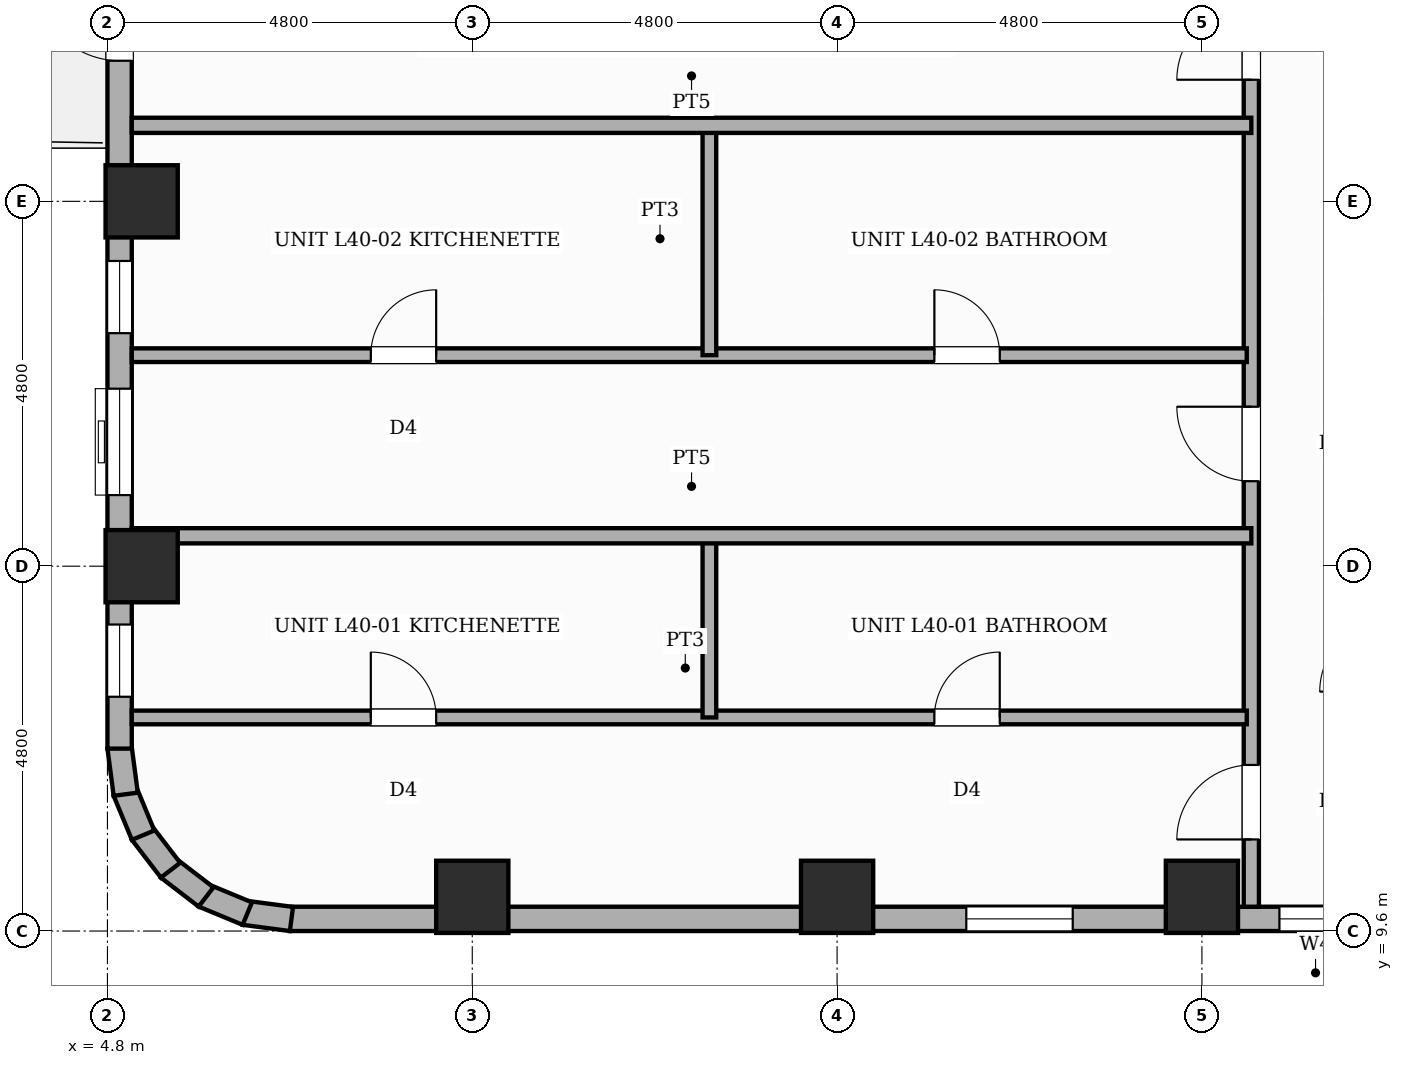
"""IFC4 building model, lengths in metres.
Left out: names, types, materials, properties, quantities, classifications, styles, units other than length and angle.
Written with IfcOpenShell. Run it as: python <this file> out.ifc"""

import sys

from ifc_helpers import new_model, si_unit, direction, frame, frame_2d, origin, origin_2d, place, context, subcontext, project, spatial, rectangle, extrude, element, fill, save


model = new_model("IFC4")
c1 = context("Model", 3, precision=1e-05, world=origin(), true_north=direction((0.0, 1.0)))
c2 = subcontext(c1, "Body", "Model", "MODEL_VIEW")
j1 = project(units=[si_unit("LENGTHUNIT", "METRE"), si_unit("PLANEANGLEUNIT", "RADIAN")], contexts=[c1])
p1 = place(None, origin())
s1 = spatial("IfcSite", under=j1, at=p1, CompositionType="ELEMENT")
p2 = place(p1, origin())
s2 = spatial("IfcBuilding", under=s1, at=p2, CompositionType="ELEMENT")
p3 = place(p2, frame((0.0, 0.0, 154.0)))
s3 = spatial("IfcBuildingStorey", under=s2, at=p3, CompositionType="ELEMENT", Elevation=154.0)
for number, where, z_axis, x_axis in (
    (1, (5.25, 14.4, 0.0), (0.0, 0.0, 1.0), (1.0, 0.0, 0.0)),
    (2, (5.25, 19.2, 0.0), (0.0, 0.0, 1.0), (1.0, 0.0, 0.0)),
    (3, (9.6, 10.05, 0.0), (0.0, 0.0, 1.0), (1.0, 0.0, 0.0)),
    (4, (14.4, 10.05, 0.0), (0.0, 0.0, 1.0), (1.0, 0.0, 0.0)),
    (5, (19.2, 10.05, 0.0), (0.0, 0.0, 1.0), (1.0, 0.0, 0.0)),
):
    element("IfcColumn", number, at=place(p3, frame(where, z_axis=z_axis, x_axis=x_axis)), inside=s3, PredefinedType="COLUMN", context=c2, shape_type="SweptSolid", body=[
        extrude(rectangle(XDim=0.95, YDim=0.95, at=origin_2d()), origin(), (0.0, 0.0, 1.0), 3.6),
    ])
p4 = place(p3, frame((21.6, 9.76, 0.0), z_axis=(0.0, 0.0, 1.0), x_axis=(-1.0, 0.0, 0.0)))
e6 = element("IfcWall", 6, at=p4, inside=s3, PredefinedType="STANDARD", context=c2, shape_type="SweptSolid", body=[
    extrude(rectangle(XDim=14.4, YDim=0.32, at=frame_2d((7.2, 0.0))), origin(), (0.0, 0.0, 1.0), 2.54),
])
p5 = place(p4, frame((4.1, 0.0, 0.65)))
e7 = element("IfcOpeningElement", 7, at=p5, cuts=e6, PredefinedType="OPENING", context=c2, shape_type="SweptSolid", body=[
    extrude(rectangle(XDim=1.4, YDim=1.1, at=frame_2d((0.7, 0.55))), frame((0.0, 0.17, 0.0), z_axis=(0.0, -1.0, 0.0), x_axis=(1.0, 0.0, 0.0)), (0.0, 0.0, 1.0), 0.34),
])
p6 = place(p4, frame((0.43, 0.0, 0.45)))
e8 = element("IfcOpeningElement", 8, at=p6, cuts=e6, PredefinedType="OPENING", context=c2, shape_type="SweptSolid", body=[
    extrude(rectangle(XDim=0.95, YDim=1.8, at=frame_2d((0.475, 0.9))), frame((0.0, 0.17, 0.0), z_axis=(0.0, -1.0, 0.0), x_axis=(1.0, 0.0, 0.0)), (0.0, 0.0, 1.0), 0.34),
])
p7 = place(p3, frame((7.221, 9.759, 0.0), z_axis=(0.0, 0.0, 1.0), x_axis=(-0.991447664465, 0.130504898859, 0.0)))
e9 = element("IfcWall", 9, at=p7, inside=s3, PredefinedType="STANDARD", context=c2, shape_type="SweptSolid", body=[
    extrude(rectangle(XDim=0.627, YDim=0.32, at=frame_2d((0.313, 0.0))), origin(), (0.0, 0.0, 1.0), 3.36),
])
p8 = place(p3, frame((6.64, 9.83, 0.0), z_axis=(0.0, 0.0, 1.0), x_axis=(-0.923836271867, 0.382787856107, 0.0)))
e10 = element("IfcWall", 10, at=p8, inside=s3, PredefinedType="STANDARD", context=c2, shape_type="SweptSolid", body=[
    extrude(rectangle(XDim=0.626, YDim=0.32, at=frame_2d((0.313, 0.0))), origin(), (0.0, 0.0, 1.0), 3.36),
])
p9 = place(p3, frame((6.097, 10.048, 0.0), z_axis=(0.0, 0.0, 1.0), x_axis=(-0.793405610854, 0.608693302629, 0.0)))
e11 = element("IfcWall", 11, at=p9, inside=s3, PredefinedType="STANDARD", context=c2, shape_type="SweptSolid", body=[
    extrude(rectangle(XDim=0.626, YDim=0.32, at=frame_2d((0.313, 0.0))), origin(), (0.0, 0.0, 1.0), 3.36),
])
p10 = place(p3, frame((5.63, 10.4, 0.0), z_axis=(0.0, 0.0, 1.0), x_axis=(-0.608938521285, 0.7932174212, 0.0)))
e12 = element("IfcWall", 12, at=p10, inside=s3, PredefinedType="STANDARD", context=c2, shape_type="SweptSolid", body=[
    extrude(rectangle(XDim=0.627, YDim=0.32, at=frame_2d((0.313, 0.0))), origin(), (0.0, 0.0, 1.0), 3.36),
])
p11 = place(p3, frame((5.269, 10.861, 0.0), z_axis=(0.0, 0.0, 1.0), x_axis=(-0.382650053678, 0.92389335771, 0.0)))
e13 = element("IfcWall", 13, at=p11, inside=s3, PredefinedType="STANDARD", context=c2, shape_type="SweptSolid", body=[
    extrude(rectangle(XDim=0.626, YDim=0.32, at=frame_2d((0.313, 0.0))), origin(), (0.0, 0.0, 1.0), 3.36),
])
p12 = place(p3, frame((5.04, 11.4, 0.0), z_axis=(0.0, 0.0, 1.0), x_axis=(-0.130504898859, 0.991447664465, 0.0)))
e14 = element("IfcWall", 14, at=p12, inside=s3, PredefinedType="STANDARD", context=c2, shape_type="SweptSolid", body=[
    extrude(rectangle(XDim=0.627, YDim=0.32, at=frame_2d((0.313, 0.0))), origin(), (0.0, 0.0, 1.0), 3.36),
])
p13 = place(p3, frame((4.96, 12.0, 0.0), z_axis=(0.0, 0.0, 1.0), x_axis=(0.0, 1.0, 0.0)))
e15 = element("IfcWall", 15, at=p13, inside=s3, PredefinedType="STANDARD", context=c2, shape_type="SweptSolid", body=[
    extrude(rectangle(XDim=33.6, YDim=0.32, at=frame_2d((16.8, 0.0))), origin(), (0.0, 0.0, 1.0), 2.54),
])
p14 = place(p13, frame((9.05, 0.0, 0.0)))
e16 = element("IfcOpeningElement", 16, at=p14, cuts=e15, PredefinedType="OPENING", context=c2, shape_type="SweptSolid", body=[
    extrude(rectangle(XDim=1.1, YDim=2.15, at=frame_2d((0.55, 1.075))), frame((0.0, 0.17, 0.0), z_axis=(0.0, -1.0, 0.0), x_axis=(1.0, 0.0, 0.0)), (0.0, 0.0, 1.0), 0.34),
])
p15 = place(p13, frame((3.335, 0.0, 0.65)))
e17 = element("IfcOpeningElement", 17, at=p15, cuts=e15, PredefinedType="OPENING", context=c2, shape_type="SweptSolid", body=[
    extrude(rectangle(XDim=1.4, YDim=1.1, at=frame_2d((0.7, 0.55))), frame((0.0, 0.17, 0.0), z_axis=(0.0, -1.0, 0.0), x_axis=(1.0, 0.0, 0.0)), (0.0, 0.0, 1.0), 0.34),
])
p16 = place(p13, frame((0.683, 0.0, 0.45)))
e18 = element("IfcOpeningElement", 18, at=p16, cuts=e15, PredefinedType="OPENING", context=c2, shape_type="SweptSolid", body=[
    extrude(rectangle(XDim=0.95, YDim=1.8, at=frame_2d((0.475, 0.9))), frame((0.0, 0.17, 0.0), z_axis=(0.0, -1.0, 0.0), x_axis=(1.0, 0.0, 0.0)), (0.0, 0.0, 1.0), 0.34),
])
p17 = place(p13, frame((5.466, 0.0, 0.45)))
e19 = element("IfcOpeningElement", 19, at=p17, cuts=e15, PredefinedType="OPENING", context=c2, shape_type="SweptSolid", body=[
    extrude(rectangle(XDim=0.95, YDim=1.8, at=frame_2d((0.475, 0.9))), frame((0.0, 0.17, 0.0), z_axis=(0.0, -1.0, 0.0), x_axis=(1.0, 0.0, 0.0)), (0.0, 0.0, 1.0), 0.34),
])
p18 = place(p13, frame((10.548, 0.0, 0.45)))
e20 = element("IfcOpeningElement", 20, at=p18, cuts=e15, PredefinedType="OPENING", context=c2, shape_type="SweptSolid", body=[
    extrude(rectangle(XDim=0.75, YDim=1.8, at=frame_2d((0.375, 0.9))), frame((0.0, 0.17, 0.0), z_axis=(0.0, -1.0, 0.0), x_axis=(1.0, 0.0, 0.0)), (0.0, 0.0, 1.0), 0.34),
])
p19 = place(p13, frame((14.558, 0.0, 0.65)))
e21 = element("IfcOpeningElement", 21, at=p19, cuts=e15, PredefinedType="OPENING", context=c2, shape_type="SweptSolid", body=[
    extrude(rectangle(XDim=1.4, YDim=1.1, at=frame_2d((0.7, 0.55))), frame((0.0, 0.17, 0.0), z_axis=(0.0, -1.0, 0.0), x_axis=(1.0, 0.0, 0.0)), (0.0, 0.0, 1.0), 0.34),
])
p20 = place(p3, frame((19.85, 9.92, 0.0), z_axis=(0.0, 0.0, 1.0), x_axis=(0.0, 1.0, 0.0)))
e22 = element("IfcWall", 22, at=p20, inside=s3, PredefinedType="PARTITIONING", context=c2, shape_type="SweptSolid", body=[
    extrude(rectangle(XDim=15.83, YDim=0.2, at=frame_2d((7.915, 0.0))), origin(), (0.0, 0.0, 1.0), 3.36),
])
p21 = place(p20, frame((0.885, 0.0, 0.0)))
e23 = element("IfcOpeningElement", 23, at=p21, cuts=e22, PredefinedType="OPENING", context=c2, shape_type="SweptSolid", body=[
    extrude(rectangle(XDim=0.98, YDim=2.18, at=frame_2d((0.49, 1.09))), frame((0.0, 0.11, 0.0), z_axis=(0.0, -1.0, 0.0), x_axis=(1.0, 0.0, 0.0)), (0.0, 0.0, 1.0), 0.22),
])
p22 = place(p20, frame((5.598, 0.0, 0.0)))
e24 = element("IfcOpeningElement", 24, at=p22, cuts=e22, PredefinedType="OPENING", context=c2, shape_type="SweptSolid", body=[
    extrude(rectangle(XDim=0.98, YDim=2.18, at=frame_2d((0.49, 1.09))), frame((0.0, 0.11, 0.0), z_axis=(0.0, -1.0, 0.0), x_axis=(1.0, 0.0, 0.0)), (0.0, 0.0, 1.0), 0.22),
])
p23 = place(p20, frame((10.88, 0.0, 0.0)))
e25 = element("IfcOpeningElement", 25, at=p23, cuts=e22, PredefinedType="OPENING", context=c2, shape_type="SweptSolid", body=[
    extrude(rectangle(XDim=0.98, YDim=2.18, at=frame_2d((0.49, 1.09))), frame((0.0, 0.11, 0.0), z_axis=(0.0, -1.0, 0.0), x_axis=(1.0, 0.0, 0.0)), (0.0, 0.0, 1.0), 0.22),
])
p24 = place(p3, frame((5.12, 12.41, 0.0), z_axis=(0.0, 0.0, 1.0), x_axis=(1.0, 0.0, 0.0)))
e26 = element("IfcWall", 26, at=p24, inside=s3, PredefinedType="PLUMBINGWALL", context=c2, shape_type="SweptSolid", body=[
    extrude(rectangle(XDim=14.67, YDim=0.18, at=frame_2d((7.335, 0.0))), origin(), (0.0, 0.0, 1.0), 3.36),
])
p25 = place(p24, frame((3.145, 0.0, 0.0)))
e27 = element("IfcOpeningElement", 27, at=p25, cuts=e26, PredefinedType="OPENING", context=c2, shape_type="SweptSolid", body=[
    extrude(rectangle(XDim=0.86, YDim=2.1, at=frame_2d((0.43, 1.05))), frame((0.0, 0.1, 0.0), z_axis=(0.0, -1.0, 0.0), x_axis=(1.0, 0.0, 0.0)), (0.0, 0.0, 1.0), 0.2),
])
p26 = place(p24, frame((10.56, 0.0, 0.0)))
e28 = element("IfcOpeningElement", 28, at=p26, cuts=e26, PredefinedType="OPENING", context=c2, shape_type="SweptSolid", body=[
    extrude(rectangle(XDim=0.86, YDim=2.1, at=frame_2d((0.43, 1.05))), frame((0.0, 0.1, 0.0), z_axis=(0.0, -1.0, 0.0), x_axis=(1.0, 0.0, 0.0)), (0.0, 0.0, 1.0), 0.2),
])
p27 = place(p3, frame((12.72, 12.41, 0.0), z_axis=(0.0, 0.0, 1.0), x_axis=(0.0, 1.0, 0.0)))
e29 = element("IfcWall", 29, at=p27, inside=s3, PredefinedType="PLUMBINGWALL", context=c2, shape_type="SweptSolid", body=[
    extrude(rectangle(XDim=2.43, YDim=0.18, at=frame_2d((1.215, 0.0))), origin(), (0.0, 0.0, 1.0), 3.36),
])
p28 = place(p3, frame((5.12, 14.8, 0.0), z_axis=(0.0, 0.0, 1.0), x_axis=(1.0, 0.0, 0.0)))
e30 = element("IfcWall", 30, at=p28, inside=s3, PredefinedType="SOLIDWALL", context=c2, shape_type="SweptSolid", body=[
    extrude(rectangle(XDim=14.73, YDim=0.2, at=frame_2d((7.365, 0.0))), origin(), (0.0, 0.0, 1.0), 3.36),
])
p29 = place(p3, frame((5.12, 17.176, 0.0), z_axis=(0.0, 0.0, 1.0), x_axis=(1.0, 0.0, 0.0)))
e31 = element("IfcWall", 31, at=p29, inside=s3, PredefinedType="PLUMBINGWALL", context=c2, shape_type="SweptSolid", body=[
    extrude(rectangle(XDim=14.67, YDim=0.18, at=frame_2d((7.335, 0.0))), origin(), (0.0, 0.0, 1.0), 3.36),
])
p30 = place(p29, frame((3.145, 0.0, 0.0)))
e32 = element("IfcOpeningElement", 32, at=p30, cuts=e31, PredefinedType="OPENING", context=c2, shape_type="SweptSolid", body=[
    extrude(rectangle(XDim=0.86, YDim=2.1, at=frame_2d((0.43, 1.05))), frame((0.0, 0.1, 0.0), z_axis=(0.0, -1.0, 0.0), x_axis=(1.0, 0.0, 0.0)), (0.0, 0.0, 1.0), 0.2),
])
p31 = place(p29, frame((10.56, 0.0, 0.0)))
e33 = element("IfcOpeningElement", 33, at=p31, cuts=e31, PredefinedType="OPENING", context=c2, shape_type="SweptSolid", body=[
    extrude(rectangle(XDim=0.86, YDim=2.1, at=frame_2d((0.43, 1.05))), frame((0.0, 0.1, 0.0), z_axis=(0.0, -1.0, 0.0), x_axis=(1.0, 0.0, 0.0)), (0.0, 0.0, 1.0), 0.2),
])
p32 = place(p3, frame((12.72, 17.176, 0.0), z_axis=(0.0, 0.0, 1.0), x_axis=(0.0, 1.0, 0.0)))
e34 = element("IfcWall", 34, at=p32, inside=s3, PredefinedType="PLUMBINGWALL", context=c2, shape_type="SweptSolid", body=[
    extrude(rectangle(XDim=3.064, YDim=0.18, at=frame_2d((1.532, 0.0))), origin(), (0.0, 0.0, 1.0), 3.36),
])
p33 = place(p3, frame((5.12, 20.2, 0.0), z_axis=(0.0, 0.0, 1.0), x_axis=(1.0, 0.0, 0.0)))
e35 = element("IfcWall", 35, at=p33, inside=s3, PredefinedType="SOLIDWALL", context=c2, shape_type="SweptSolid", body=[
    extrude(rectangle(XDim=14.73, YDim=0.2, at=frame_2d((7.365, 0.0))), origin(), (0.0, 0.0, 1.0), 3.36),
])
p34 = place(p5, origin())
e36 = element("IfcWindow", 36, at=p34, inside=s3, PartitioningType="SINGLE_PANEL", PredefinedType="WINDOW", context=c2, shape_type="SweptSolid", body=[
    extrude(rectangle(XDim=1.4, YDim=1.1, at=frame_2d((0.7, 0.55))), frame((0.0, 0.03, 0.0), z_axis=(0.0, -1.0, 0.0), x_axis=(1.0, 0.0, 0.0)), (0.0, 0.0, 1.0), 0.06),
])
fill(e7, e36)
p35 = place(p6, origin())
e37 = element("IfcWindow", 37, at=p35, inside=s3, PartitioningType="SINGLE_PANEL", PredefinedType="WINDOW", context=c2, shape_type="SweptSolid", body=[
    extrude(rectangle(XDim=0.95, YDim=1.8, at=frame_2d((0.475, 0.9))), frame((0.0, 0.03, 0.0), z_axis=(0.0, -1.0, 0.0), x_axis=(1.0, 0.0, 0.0)), (0.0, 0.0, 1.0), 0.06),
])
fill(e8, e37)
p36 = place(p14, origin())
e38 = element("IfcDoor", 38, at=p36, inside=s3, OperationType="SINGLE_SWING_RIGHT", PredefinedType="DOOR", context=c2, shape_type="SweptSolid", body=[
    extrude(rectangle(XDim=1.1, YDim=2.15, at=frame_2d((0.55, 1.075))), frame((0.0, 0.025, 0.0), z_axis=(0.0, -1.0, 0.0), x_axis=(1.0, 0.0, 0.0)), (0.0, 0.0, 1.0), 0.05),
])
fill(e16, e38)
p37 = place(p15, origin())
e39 = element("IfcWindow", 39, at=p37, inside=s3, PartitioningType="SINGLE_PANEL", PredefinedType="WINDOW", context=c2, shape_type="SweptSolid", body=[
    extrude(rectangle(XDim=1.4, YDim=1.1, at=frame_2d((0.7, 0.55))), frame((0.0, 0.03, 0.0), z_axis=(0.0, -1.0, 0.0), x_axis=(1.0, 0.0, 0.0)), (0.0, 0.0, 1.0), 0.06),
])
fill(e17, e39)
p38 = place(p16, origin())
e40 = element("IfcWindow", 40, at=p38, inside=s3, PartitioningType="SINGLE_PANEL", PredefinedType="WINDOW", context=c2, shape_type="SweptSolid", body=[
    extrude(rectangle(XDim=0.95, YDim=1.8, at=frame_2d((0.475, 0.9))), frame((0.0, 0.03, 0.0), z_axis=(0.0, -1.0, 0.0), x_axis=(1.0, 0.0, 0.0)), (0.0, 0.0, 1.0), 0.06),
])
fill(e18, e40)
p39 = place(p17, origin())
e41 = element("IfcWindow", 41, at=p39, inside=s3, PartitioningType="SINGLE_PANEL", PredefinedType="WINDOW", context=c2, shape_type="SweptSolid", body=[
    extrude(rectangle(XDim=0.95, YDim=1.8, at=frame_2d((0.475, 0.9))), frame((0.0, 0.03, 0.0), z_axis=(0.0, -1.0, 0.0), x_axis=(1.0, 0.0, 0.0)), (0.0, 0.0, 1.0), 0.06),
])
fill(e19, e41)
p40 = place(p21, origin())
e42 = element("IfcDoor", 42, at=p40, inside=s3, OperationType="SINGLE_SWING_LEFT", PredefinedType="DOOR", context=c2, shape_type="SweptSolid", body=[
    extrude(rectangle(XDim=0.98, YDim=2.18, at=frame_2d((0.49, 1.09))), frame((0.0, 0.025, 0.0), z_axis=(0.0, -1.0, 0.0), x_axis=(1.0, 0.0, 0.0)), (0.0, 0.0, 1.0), 0.05),
])
fill(e23, e42)
p41 = place(p25, origin())
e43 = element("IfcDoor", 43, at=p41, inside=s3, OperationType="SINGLE_SWING_LEFT", PredefinedType="DOOR", context=c2, shape_type="SweptSolid", body=[
    extrude(rectangle(XDim=0.86, YDim=2.1, at=frame_2d((0.43, 1.05))), frame((0.0, 0.025, 0.0), z_axis=(0.0, -1.0, 0.0), x_axis=(1.0, 0.0, 0.0)), (0.0, 0.0, 1.0), 0.05),
])
fill(e27, e43)
p42 = place(p26, origin())
e44 = element("IfcDoor", 44, at=p42, inside=s3, OperationType="SINGLE_SWING_RIGHT", PredefinedType="DOOR", context=c2, shape_type="SweptSolid", body=[
    extrude(rectangle(XDim=0.86, YDim=2.1, at=frame_2d((0.43, 1.05))), frame((0.0, 0.025, 0.0), z_axis=(0.0, -1.0, 0.0), x_axis=(1.0, 0.0, 0.0)), (0.0, 0.0, 1.0), 0.05),
])
fill(e28, e44)
p43 = place(p22, origin())
e45 = element("IfcDoor", 45, at=p43, inside=s3, OperationType="SINGLE_SWING_RIGHT", PredefinedType="DOOR", context=c2, shape_type="SweptSolid", body=[
    extrude(rectangle(XDim=0.98, YDim=2.18, at=frame_2d((0.49, 1.09))), frame((0.0, 0.025, 0.0), z_axis=(0.0, -1.0, 0.0), x_axis=(1.0, 0.0, 0.0)), (0.0, 0.0, 1.0), 0.05),
])
fill(e24, e45)
p44 = place(p30, origin())
e46 = element("IfcDoor", 46, at=p44, inside=s3, OperationType="SINGLE_SWING_RIGHT", PredefinedType="DOOR", context=c2, shape_type="SweptSolid", body=[
    extrude(rectangle(XDim=0.86, YDim=2.1, at=frame_2d((0.43, 1.05))), frame((0.0, 0.025, 0.0), z_axis=(0.0, -1.0, 0.0), x_axis=(1.0, 0.0, 0.0)), (0.0, 0.0, 1.0), 0.05),
])
fill(e32, e46)
p45 = place(p31, origin())
e47 = element("IfcDoor", 47, at=p45, inside=s3, OperationType="SINGLE_SWING_LEFT", PredefinedType="DOOR", context=c2, shape_type="SweptSolid", body=[
    extrude(rectangle(XDim=0.86, YDim=2.1, at=frame_2d((0.43, 1.05))), frame((0.0, 0.025, 0.0), z_axis=(0.0, -1.0, 0.0), x_axis=(1.0, 0.0, 0.0)), (0.0, 0.0, 1.0), 0.05),
])
fill(e33, e47)
p46 = place(p23, origin())
e48 = element("IfcDoor", 48, at=p46, inside=s3, OperationType="SINGLE_SWING_LEFT", PredefinedType="DOOR", context=c2, shape_type="SweptSolid", body=[
    extrude(rectangle(XDim=0.98, YDim=2.18, at=frame_2d((0.49, 1.09))), frame((0.0, 0.025, 0.0), z_axis=(0.0, -1.0, 0.0), x_axis=(1.0, 0.0, 0.0)), (0.0, 0.0, 1.0), 0.05),
])
fill(e25, e48)
save(model, sys.argv[1])
